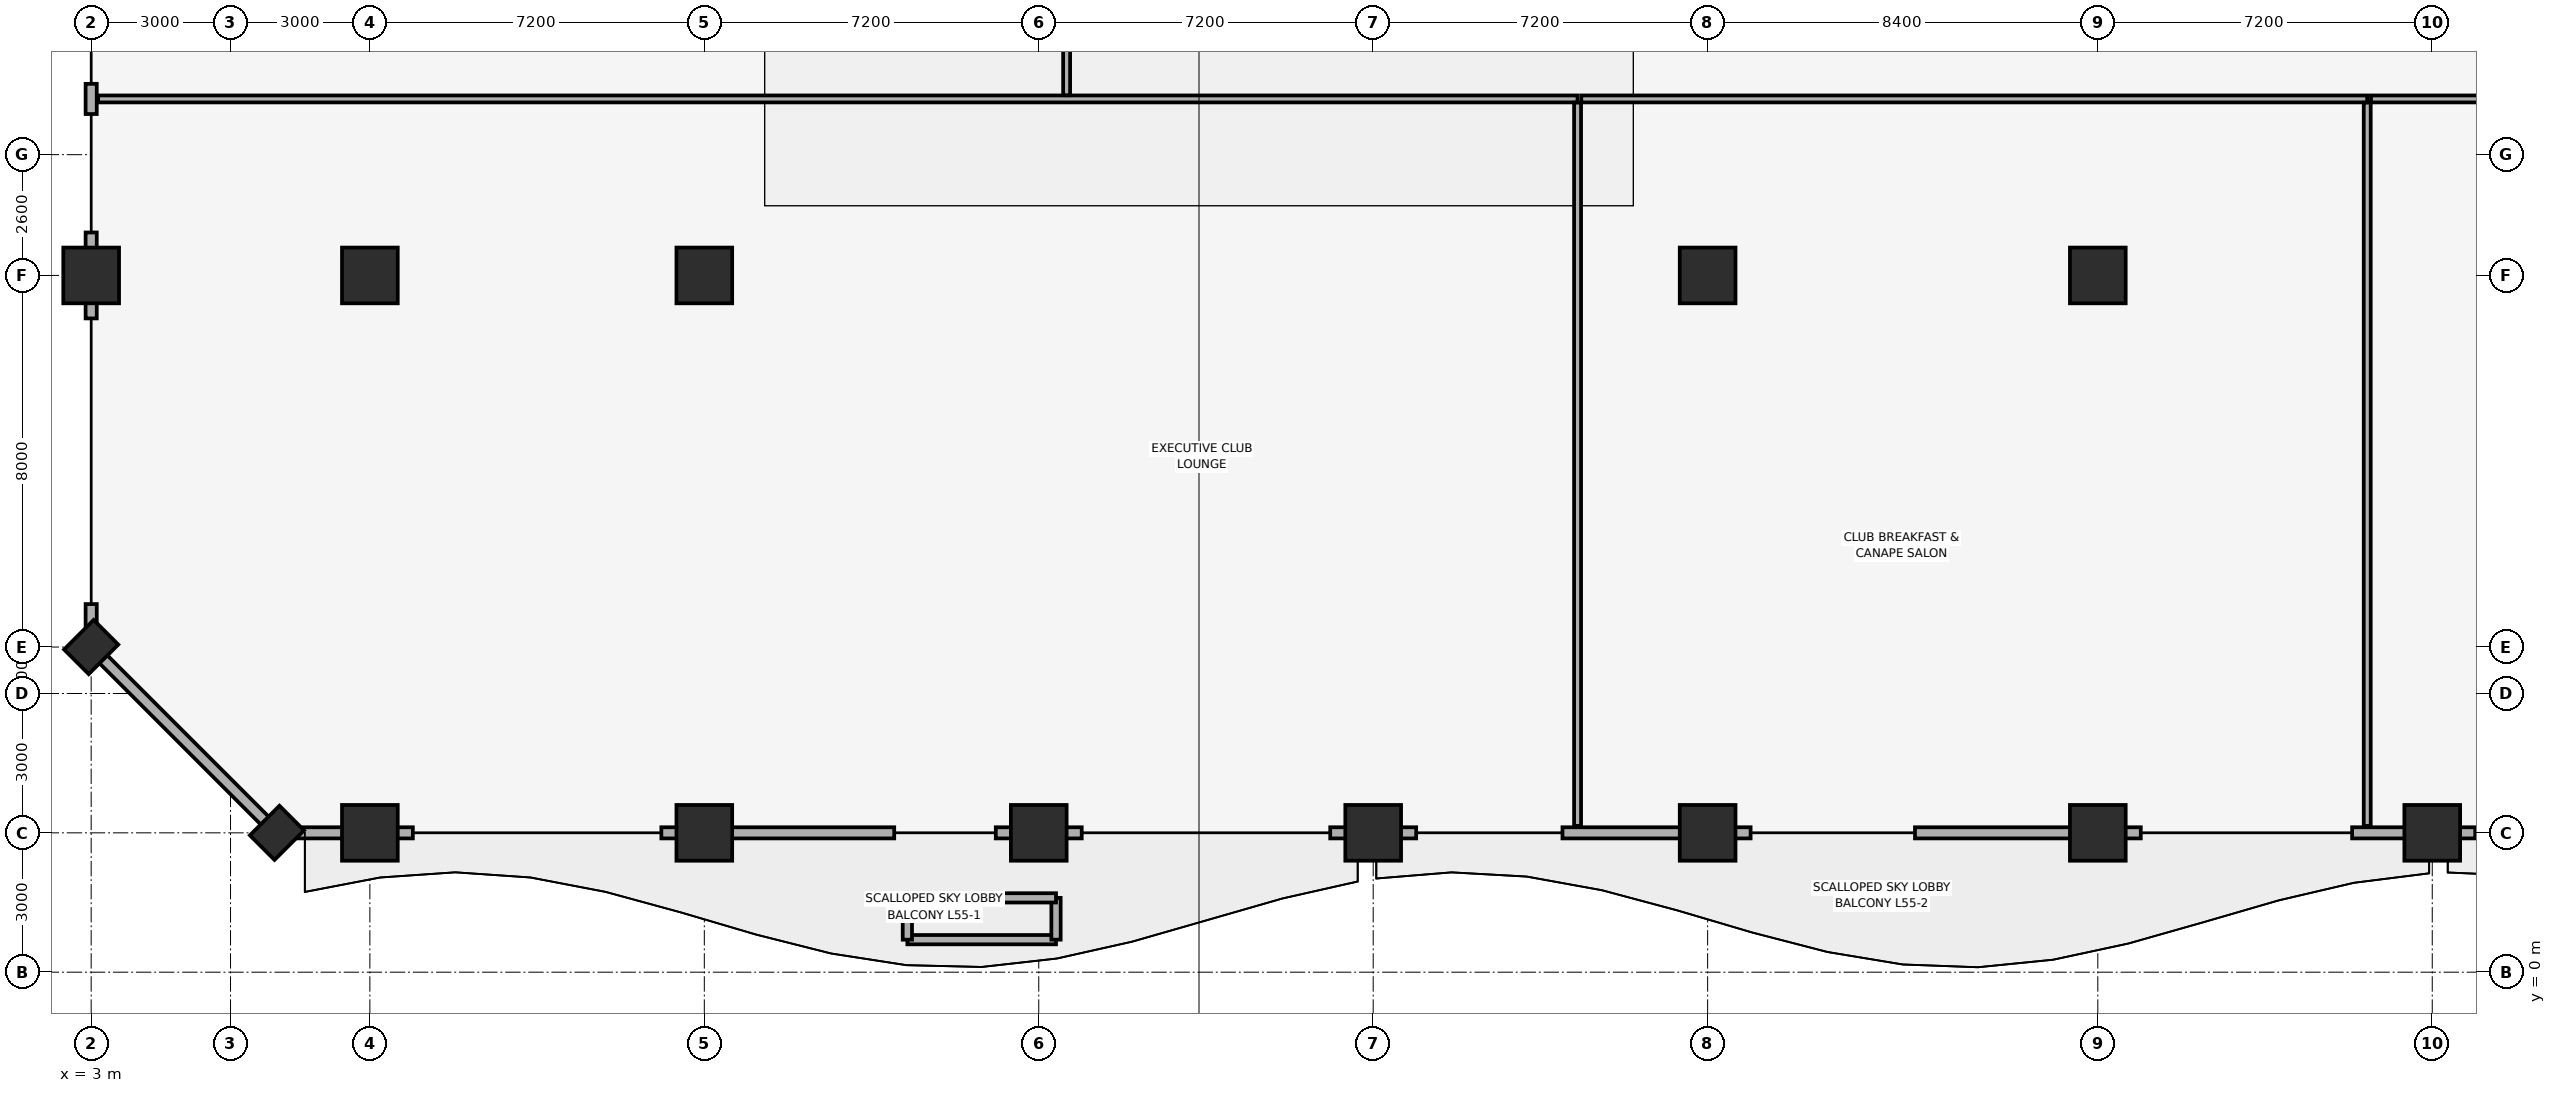
"""IFC4 building model, lengths in metres.
Left out: names, types, materials, properties, quantities, classifications, styles, units other than length and angle.
Written with IfcOpenShell. Run it as: python <this file> out.ifc"""

import sys

from ifc_helpers import new_model, si_unit, direction, frame, frame_2d, origin, origin_2d, place, context, subcontext, project, spatial, rectangle, extrude, element, fill, save


model = new_model("IFC4")
c1 = context("Model", 3, precision=1e-05, world=origin(), true_north=direction((0.0, 1.0)))
c2 = subcontext(c1, "Body", "Model", "MODEL_VIEW")
j1 = project(units=[si_unit("LENGTHUNIT", "METRE"), si_unit("PLANEANGLEUNIT", "RADIAN")], contexts=[c1])
p1 = place(None, origin())
s1 = spatial("IfcSite", under=j1, at=p1, CompositionType="ELEMENT")
p2 = place(p1, origin())
s2 = spatial("IfcBuilding", under=s1, at=p2, CompositionType="ELEMENT")
p3 = place(p2, frame((0.0, 0.0, 224.35)))
s3 = spatial("IfcBuildingStorey", under=s2, at=p3, CompositionType="ELEMENT", Elevation=224.35)
for number, where, z_axis, x_axis in (
    (1, (9.0, 3.0, 0.0), (0.0, 0.0, 1.0), (1.0, 0.0, 0.0)),
    (2, (16.2, 3.0, 0.0), (0.0, 0.0, 1.0), (1.0, 0.0, 0.0)),
    (3, (23.4, 3.0, 0.0), (0.0, 0.0, 1.0), (1.0, 0.0, 0.0)),
    (4, (30.6, 3.0, 0.0), (0.0, 0.0, 1.0), (1.0, 0.0, 0.0)),
    (5, (37.8, 3.0, 0.0), (0.0, 0.0, 1.0), (1.0, 0.0, 0.0)),
    (6, (46.2, 3.0, 0.0), (0.0, 0.0, 1.0), (1.0, 0.0, 0.0)),
    (7, (53.4, 3.0, 0.0), (0.0, 0.0, 1.0), (1.0, 0.0, 0.0)),
    (8, (3.0, 15.0, 0.0), (0.0, 0.0, 1.0), (1.0, 0.0, 0.0)),
):
    element("IfcColumn", number, at=place(p3, frame(where, z_axis=z_axis, x_axis=x_axis)), inside=s3, PredefinedType="COLUMN", context=c2, shape_type="SweptSolid", body=[
        extrude(rectangle(XDim=1.2, YDim=1.2, at=origin_2d()), origin(), (0.0, 0.0, 1.0), 4.56),
    ])
for number, where, z_axis, x_axis in (
    (9, (7.0, 3.0, 0.0), (0.0, 0.0, 1.0), (0.707, 0.707, 0.0)),
    (10, (3.0, 7.0, 0.0), (0.0, 0.0, 1.0), (0.707, 0.707, 0.0)),
):
    element("IfcColumn", number, at=place(p3, frame(where, z_axis=z_axis, x_axis=x_axis)), inside=s3, PredefinedType="PILASTER", context=c2, shape_type="SweptSolid", body=[
        extrude(rectangle(XDim=0.9, YDim=0.75, at=origin_2d()), origin(), (0.0, 0.0, 1.0), 4.56),
    ])
for number, where, z_axis, x_axis in (
    (11, (9.0, 15.0, 0.0), (0.0, 0.0, 1.0), (1.0, 0.0, 0.0)),
    (12, (16.2, 15.0, 0.0), (0.0, 0.0, 1.0), (1.0, 0.0, 0.0)),
    (13, (37.8, 15.0, 0.0), (0.0, 0.0, 1.0), (1.0, 0.0, 0.0)),
    (14, (46.2, 15.0, 0.0), (0.0, 0.0, 1.0), (1.0, 0.0, 0.0)),
):
    element("IfcColumn", number, at=place(p3, frame(where, z_axis=z_axis, x_axis=x_axis)), inside=s3, PredefinedType="COLUMN", context=c2, shape_type="SweptSolid", body=[
        extrude(rectangle(XDim=1.2, YDim=1.2, at=origin_2d()), origin(), (0.0, 0.0, 1.0), 4.56),
    ])
p4 = place(p3, frame((7.0, 3.0, 0.0), z_axis=(0.0, 0.0, 1.0), x_axis=(1.0, 0.0, 0.0)))
e15 = element("IfcWall", 15, at=p4, inside=s3, PredefinedType="SOLIDWALL", context=c2, shape_type="SweptSolid", body=[
    extrude(rectangle(XDim=2.925, YDim=0.24, at=frame_2d((1.462, 0.0))), origin(), (0.0, 0.0, 1.0), 4.52),
])
p5 = place(p3, frame((15.275, 3.0, 0.0), z_axis=(0.0, 0.0, 1.0), x_axis=(1.0, 0.0, 0.0)))
e16 = element("IfcWall", 16, at=p5, inside=s3, PredefinedType="SOLIDWALL", context=c2, shape_type="SweptSolid", body=[
    extrude(rectangle(XDim=5.013, YDim=0.24, at=frame_2d((2.507, 0.0))), origin(), (0.0, 0.0, 1.0), 3.4),
])
p6 = place(p5, frame((3.108, 0.0, 0.0)))
e17 = element("IfcOpeningElement", 17, at=p6, cuts=e16, PredefinedType="OPENING", context=c2, shape_type="SweptSolid", body=[
    extrude(rectangle(XDim=1.1, YDim=2.15, at=frame_2d((0.55, 1.075))), frame((0.0, 0.13, 0.0), z_axis=(0.0, -1.0, 0.0), x_axis=(1.0, 0.0, 0.0)), (0.0, 0.0, 1.0), 0.26),
])
for number, where, z_axis, x_axis in (
    (18, (22.475, 3.0, 0.0), (0.0, 0.0, 1.0), (1.0, 0.0, 0.0)),
    (19, (29.675, 3.0, 0.0), (0.0, 0.0, 1.0), (1.0, 0.0, 0.0)),
):
    element("IfcWall", number, at=place(p3, frame(where, z_axis=z_axis, x_axis=x_axis)), inside=s3, PredefinedType="SOLIDWALL", context=c2, shape_type="SweptSolid", body=[
        extrude(rectangle(XDim=1.85, YDim=0.24, at=frame_2d((0.925, 0.0))), origin(), (0.0, 0.0, 1.0), 4.52),
    ])
p7 = place(p3, frame((34.675, 3.0, 0.0), z_axis=(0.0, 0.0, 1.0), x_axis=(1.0, 0.0, 0.0)))
e20 = element("IfcWall", 20, at=p7, inside=s3, PredefinedType="SOLIDWALL", context=c2, shape_type="SweptSolid", body=[
    extrude(rectangle(XDim=4.05, YDim=0.24, at=frame_2d((2.025, 0.0))), origin(), (0.0, 0.0, 1.0), 3.4),
])
p8 = place(p3, frame((42.264, 3.0, 0.0), z_axis=(0.0, 0.0, 1.0), x_axis=(1.0, 0.0, 0.0)))
e21 = element("IfcWall", 21, at=p8, inside=s3, PredefinedType="SOLIDWALL", context=c2, shape_type="SweptSolid", body=[
    extrude(rectangle(XDim=4.861, YDim=0.24, at=frame_2d((2.431, 0.0))), origin(), (0.0, 0.0, 1.0), 3.4),
])
p9 = place(p8, frame((0.805, 0.0, 0.0)))
e22 = element("IfcOpeningElement", 22, at=p9, cuts=e21, PredefinedType="OPENING", context=c2, shape_type="SweptSolid", body=[
    extrude(rectangle(XDim=1.1, YDim=2.15, at=frame_2d((0.55, 1.075))), frame((0.0, 0.13, 0.0), z_axis=(0.0, -1.0, 0.0), x_axis=(1.0, 0.0, 0.0)), (0.0, 0.0, 1.0), 0.26),
])
p10 = place(p3, frame((51.675, 3.0, 0.0), z_axis=(0.0, 0.0, 1.0), x_axis=(1.0, 0.0, 0.0)))
e23 = element("IfcWall", 23, at=p10, inside=s3, PredefinedType="SOLIDWALL", context=c2, shape_type="SweptSolid", body=[
    extrude(rectangle(XDim=2.65, YDim=0.24, at=frame_2d((1.325, 0.0))), origin(), (0.0, 0.0, 1.0), 3.4),
])
p11 = place(p3, frame((3.0, 19.125, 0.0), z_axis=(0.0, 0.0, 1.0), x_axis=(0.0, -1.0, 0.0)))
e24 = element("IfcWall", 24, at=p11, inside=s3, PredefinedType="SOLIDWALL", context=c2, shape_type="SweptSolid", body=[
    extrude(rectangle(XDim=0.65, YDim=0.24, at=frame_2d((0.325, 0.0))), origin(), (0.0, 0.0, 1.0), 4.52),
])
p12 = place(p3, frame((3.0, 15.925, 0.0), z_axis=(0.0, 0.0, 1.0), x_axis=(0.0, -1.0, 0.0)))
e25 = element("IfcWall", 25, at=p12, inside=s3, PredefinedType="SOLIDWALL", context=c2, shape_type="SweptSolid", body=[
    extrude(rectangle(XDim=1.85, YDim=0.24, at=frame_2d((0.925, 0.0))), origin(), (0.0, 0.0, 1.0), 4.52),
])
p13 = place(p3, frame((3.0, 7.925, 0.0), z_axis=(0.0, 0.0, 1.0), x_axis=(0.0, -1.0, 0.0)))
e26 = element("IfcWall", 26, at=p13, inside=s3, PredefinedType="SOLIDWALL", context=c2, shape_type="SweptSolid", body=[
    extrude(rectangle(XDim=0.925, YDim=0.24, at=frame_2d((0.462, 0.0))), origin(), (0.0, 0.0, 1.0), 4.52),
])
p14 = place(p3, frame((3.0, 7.0, 0.0), z_axis=(0.0, 0.0, 1.0), x_axis=(0.707106781187, -0.707106781187, 0.0)))
e27 = element("IfcWall", 27, at=p14, inside=s3, PredefinedType="SOLIDWALL", context=c2, shape_type="SweptSolid", body=[
    extrude(rectangle(XDim=5.657, YDim=0.24, at=frame_2d((2.828, 0.0))), origin(), (0.0, 0.0, 1.0), 4.52),
])
p15 = place(p14, frame((1.778, 0.0, 0.85)))
e28 = element("IfcOpeningElement", 28, at=p15, cuts=e27, PredefinedType="OPENING", context=c2, shape_type="SweptSolid", body=[
    extrude(rectangle(XDim=2.1, YDim=1.6, at=frame_2d((1.05, 0.8))), frame((0.0, 0.13, 0.0), z_axis=(0.0, -1.0, 0.0), x_axis=(1.0, 0.0, 0.0)), (0.0, 0.0, 1.0), 0.26),
])
p16 = place(p3, frame((20.572, 0.7, 0.0), z_axis=(0.0, 0.0, 1.0), x_axis=(1.0, 0.0, 0.0)))
e29 = element("IfcWall", 29, at=p16, inside=s3, PredefinedType="PARAPET", context=c2, shape_type="SweptSolid", body=[
    extrude(rectangle(XDim=3.2, YDim=0.2, at=frame_2d((1.6, 0.0))), origin(), (0.0, 0.0, 1.0), 0.55),
])
p17 = place(p3, frame((23.771, 0.7, 0.0), z_axis=(0.0, 0.0, 1.0), x_axis=(0.0, 1.0, 0.0)))
e30 = element("IfcWall", 30, at=p17, inside=s3, PredefinedType="PARAPET", context=c2, shape_type="SweptSolid", body=[
    extrude(rectangle(XDim=0.9, YDim=0.2, at=frame_2d((0.45, 0.0))), origin(), (0.0, 0.0, 1.0), 0.55),
])
p18 = place(p3, frame((23.771, 1.6, 0.0), z_axis=(0.0, 0.0, 1.0), x_axis=(-1.0, 0.0, 0.0)))
e31 = element("IfcWall", 31, at=p18, inside=s3, PredefinedType="PARAPET", context=c2, shape_type="SweptSolid", body=[
    extrude(rectangle(XDim=3.2, YDim=0.2, at=frame_2d((1.6, 0.0))), origin(), (0.0, 0.0, 1.0), 0.55),
])
p19 = place(p3, frame((20.572, 1.6, 0.0), z_axis=(0.0, 0.0, 1.0), x_axis=(0.0, -1.0, 0.0)))
e32 = element("IfcWall", 32, at=p19, inside=s3, PredefinedType="PARAPET", context=c2, shape_type="SweptSolid", body=[
    extrude(rectangle(XDim=0.9, YDim=0.2, at=frame_2d((0.45, 0.0))), origin(), (0.0, 0.0, 1.0), 0.55),
])
p20 = place(p3, frame((3.15, 18.8, 0.0), z_axis=(0.0, 0.0, 1.0), x_axis=(1.0, 0.0, 0.0)))
e33 = element("IfcWall", 33, at=p20, inside=s3, PredefinedType="PARTITIONING", context=c2, shape_type="SweptSolid", body=[
    extrude(rectangle(XDim=31.85, YDim=0.15, at=frame_2d((15.925, 0.0))), origin(), (0.0, 0.0, 1.0), 4.52),
])
p21 = place(p20, frame((25.1, 0.0, 0.0)))
e34 = element("IfcOpeningElement", 34, at=p21, cuts=e33, PredefinedType="OPENING", context=c2, shape_type="SweptSolid", body=[
    extrude(rectangle(XDim=1.5, YDim=2.25, at=frame_2d((0.75, 1.125))), frame((0.0, 0.085, 0.0), z_axis=(0.0, -1.0, 0.0), x_axis=(1.0, 0.0, 0.0)), (0.0, 0.0, 1.0), 0.17),
])
p22 = place(p3, frame((35.0, 3.15, 0.0), z_axis=(0.0, 0.0, 1.0), x_axis=(0.0, 1.0, 0.0)))
e35 = element("IfcWall", 35, at=p22, inside=s3, PredefinedType="PARTITIONING", context=c2, shape_type="SweptSolid", body=[
    extrude(rectangle(XDim=15.57, YDim=0.15, at=frame_2d((7.785, 0.0))), origin(), (0.0, 0.0, 1.0), 4.52),
])
p23 = place(p3, frame((35.08, 18.8, 0.0), z_axis=(0.0, 0.0, 1.0), x_axis=(1.0, 0.0, 0.0)))
e36 = element("IfcWall", 36, at=p23, inside=s3, PredefinedType="PARTITIONING", context=c2, shape_type="SweptSolid", body=[
    extrude(rectangle(XDim=16.92, YDim=0.15, at=frame_2d((8.46, 0.0))), origin(), (0.0, 0.0, 1.0), 4.52),
])
p24 = place(p23, frame((6.17, 0.0, 0.0)))
e37 = element("IfcOpeningElement", 37, at=p24, cuts=e36, PredefinedType="OPENING", context=c2, shape_type="SweptSolid", body=[
    extrude(rectangle(XDim=1.5, YDim=2.25, at=frame_2d((0.75, 1.125))), frame((0.0, 0.085, 0.0), z_axis=(0.0, -1.0, 0.0), x_axis=(1.0, 0.0, 0.0)), (0.0, 0.0, 1.0), 0.17),
])
p25 = place(p3, frame((52.0, 3.15, 0.0), z_axis=(0.0, 0.0, 1.0), x_axis=(0.0, 1.0, 0.0)))
e38 = element("IfcWall", 38, at=p25, inside=s3, PredefinedType="PARTITIONING", context=c2, shape_type="SweptSolid", body=[
    extrude(rectangle(XDim=15.57, YDim=0.15, at=frame_2d((7.785, 0.0))), origin(), (0.0, 0.0, 1.0), 4.52),
])
p26 = place(p3, frame((52.08, 18.8, 0.0), z_axis=(0.0, 0.0, 1.0), x_axis=(1.0, 0.0, 0.0)))
e39 = element("IfcWall", 39, at=p26, inside=s3, PredefinedType="PARTITIONING", context=c2, shape_type="SweptSolid", body=[
    extrude(rectangle(XDim=28.77, YDim=0.15, at=frame_2d((14.385, 0.0))), origin(), (0.0, 0.0, 1.0), 4.52),
])
p27 = place(p26, frame((2.67, 0.0, 0.0)))
e40 = element("IfcOpeningElement", 40, at=p27, cuts=e39, PredefinedType="OPENING", context=c2, shape_type="SweptSolid", body=[
    extrude(rectangle(XDim=1.5, YDim=2.25, at=frame_2d((0.75, 1.125))), frame((0.0, 0.085, 0.0), z_axis=(0.0, -1.0, 0.0), x_axis=(1.0, 0.0, 0.0)), (0.0, 0.0, 1.0), 0.17),
])
p28 = place(p3, frame((24.0, 18.88, 0.0), z_axis=(0.0, 0.0, 1.0), x_axis=(0.0, 1.0, 0.0)))
e41 = element("IfcWall", 41, at=p28, inside=s3, PredefinedType="PARTITIONING", context=c2, shape_type="SweptSolid", body=[
    extrude(rectangle(XDim=7.84, YDim=0.15, at=frame_2d((3.92, 0.0))), origin(), (0.0, 0.0, 1.0), 4.52),
])
p29 = place(p15, origin())
e42 = element("IfcWindow", 42, at=p29, inside=s3, PartitioningType="SINGLE_PANEL", PredefinedType="WINDOW", context=c2, shape_type="SweptSolid", body=[
    extrude(rectangle(XDim=2.1, YDim=1.6, at=frame_2d((1.05, 0.8))), frame((0.0, 0.03, 0.0), z_axis=(0.0, -1.0, 0.0), x_axis=(1.0, 0.0, 0.0)), (0.0, 0.0, 1.0), 0.06),
])
fill(e28, e42)
p30 = place(p6, origin())
e43 = element("IfcDoor", 43, at=p30, inside=s3, OperationType="SINGLE_SWING_RIGHT", PredefinedType="DOOR", context=c2, shape_type="SweptSolid", body=[
    extrude(rectangle(XDim=1.1, YDim=2.15, at=frame_2d((0.55, 1.075))), frame((0.0, 0.025, 0.0), z_axis=(0.0, -1.0, 0.0), x_axis=(1.0, 0.0, 0.0)), (0.0, 0.0, 1.0), 0.05),
])
fill(e17, e43)
p31 = place(p9, origin())
e44 = element("IfcDoor", 44, at=p31, inside=s3, OperationType="SINGLE_SWING_LEFT", PredefinedType="DOOR", context=c2, shape_type="SweptSolid", body=[
    extrude(rectangle(XDim=1.1, YDim=2.15, at=frame_2d((0.55, 1.075))), frame((0.0, 0.025, 0.0), z_axis=(0.0, -1.0, 0.0), x_axis=(1.0, 0.0, 0.0)), (0.0, 0.0, 1.0), 0.05),
])
fill(e22, e44)
p32 = place(p21, origin())
e45 = element("IfcDoor", 45, at=p32, inside=s3, OperationType="DOUBLE_DOOR_SINGLE_SWING", PredefinedType="DOOR", context=c2, shape_type="SweptSolid", body=[
    extrude(rectangle(XDim=1.5, YDim=2.25, at=frame_2d((0.75, 1.125))), frame((0.0, 0.025, 0.0), z_axis=(0.0, -1.0, 0.0), x_axis=(1.0, 0.0, 0.0)), (0.0, 0.0, 1.0), 0.05),
])
fill(e34, e45)
p33 = place(p24, origin())
e46 = element("IfcDoor", 46, at=p33, inside=s3, OperationType="DOUBLE_DOOR_SINGLE_SWING", PredefinedType="DOOR", context=c2, shape_type="SweptSolid", body=[
    extrude(rectangle(XDim=1.5, YDim=2.25, at=frame_2d((0.75, 1.125))), frame((0.0, 0.025, 0.0), z_axis=(0.0, -1.0, 0.0), x_axis=(1.0, 0.0, 0.0)), (0.0, 0.0, 1.0), 0.05),
])
fill(e37, e46)
save(model, sys.argv[1])
